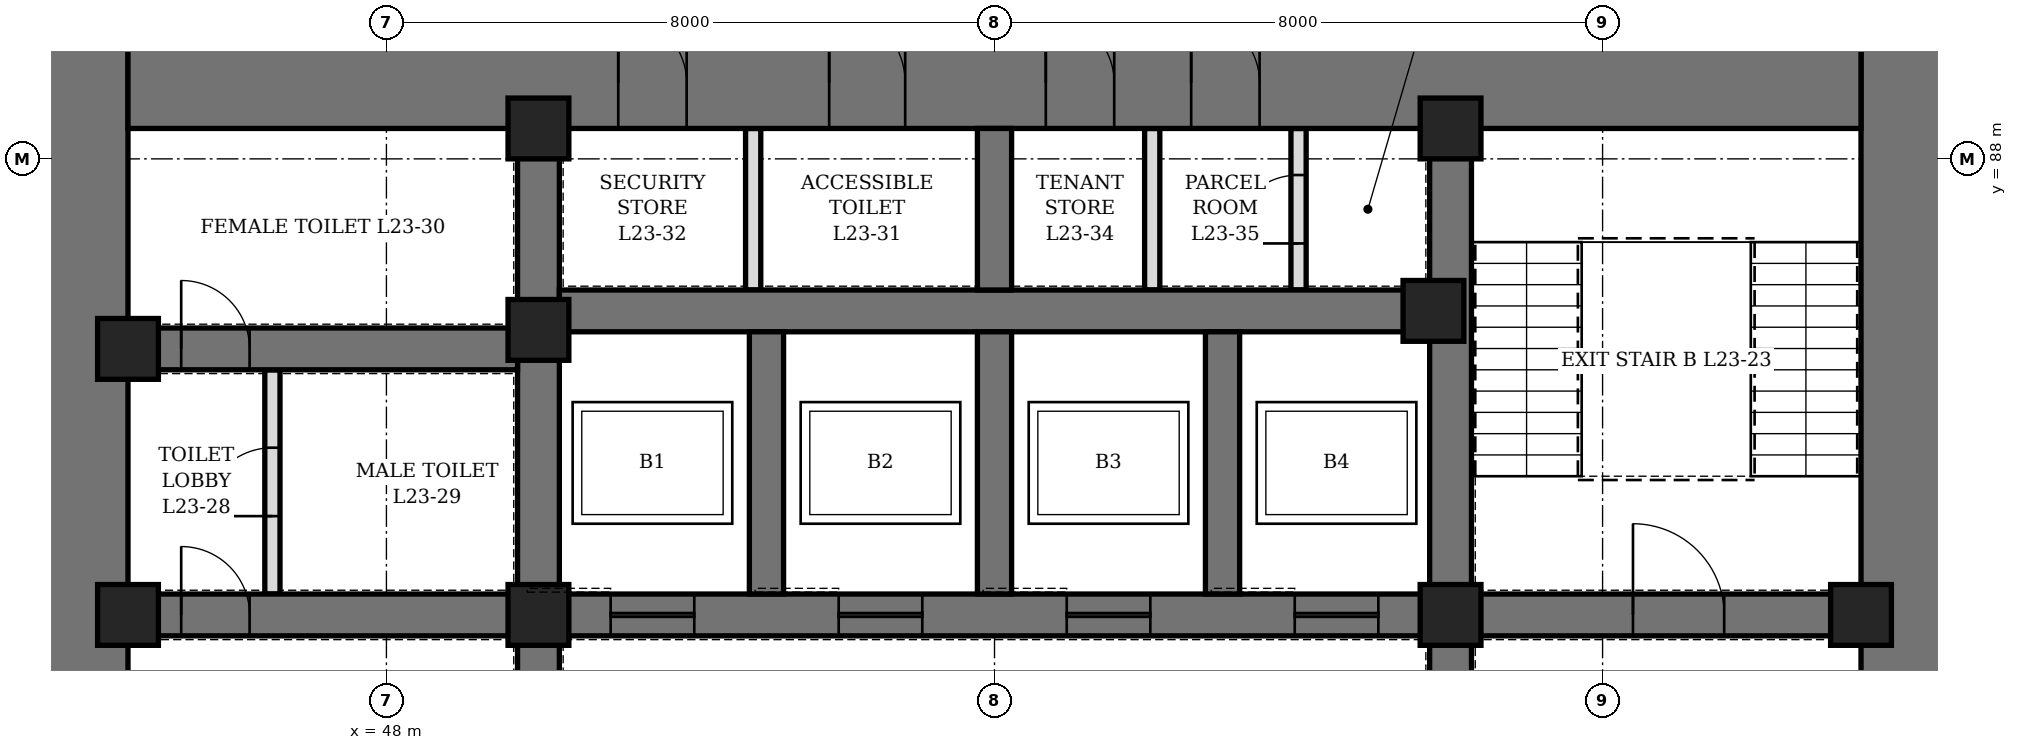
"""IFC4 building model, lengths in metres.
Left out: names, types, materials, properties, quantities, classifications, styles, units other than length and angle.
Written with IfcOpenShell. Run it as: python <this file> out.ifc"""

import sys

from ifc_helpers import new_model, si_unit, direction, frame, frame_2d, origin, origin_2d, place, context, subcontext, project, spatial, rectangle, hollow_rectangle, extrude, element, fill, save


model = new_model("IFC4")
c1 = context("Model", 3, precision=1e-05, world=origin(), true_north=direction((0.0, 1.0)))
c2 = subcontext(c1, "Body", "Model", "MODEL_VIEW")
j1 = project(units=[si_unit("LENGTHUNIT", "METRE"), si_unit("PLANEANGLEUNIT", "RADIAN")], contexts=[c1])
p1 = place(None, origin())
s1 = spatial("IfcSite", under=j1, at=p1, CompositionType="ELEMENT")
p2 = place(p1, origin())
s2 = spatial("IfcBuilding", under=s1, at=p2, CompositionType="ELEMENT")
p3 = place(p2, frame((0.0, 0.0, 108.1)))
s3 = spatial("IfcBuildingStorey", under=s2, at=p3, CompositionType="ELEMENT", Elevation=108.1)
p4 = place(p3, frame((44.0, 70.4, 0.0), z_axis=(0.0, 0.0, 1.0), x_axis=(0.0, 1.0, 0.0)))
e1 = element("IfcWall", 1, at=p4, inside=s3, PredefinedType="SHEAR", context=c2, shape_type="SweptSolid", body=[
    extrude(rectangle(XDim=19.2, YDim=1.2, at=frame_2d((9.6, 0.0))), origin(), (0.0, 0.0, 1.0), 4.2),
])
p5 = place(p4, frame((8.6, 0.0, 0.0)))
e2 = element("IfcOpeningElement", 2, at=p5, cuts=e1, PredefinedType="OPENING", context=c2, shape_type="SweptSolid", body=[
    extrude(rectangle(XDim=2.0, YDim=2.4, at=frame_2d((1.0, 1.2))), frame((0.0, 0.61, 0.0), z_axis=(0.0, -1.0, 0.0), x_axis=(1.0, 0.0, 0.0)), (0.0, 0.0, 1.0), 1.22),
])
p6 = place(p3, frame((68.0, 70.4, 0.0), z_axis=(0.0, 0.0, 1.0), x_axis=(0.0, 1.0, 0.0)))
e3 = element("IfcWall", 3, at=p6, inside=s3, PredefinedType="SHEAR", context=c2, shape_type="SweptSolid", body=[
    extrude(rectangle(XDim=19.2, YDim=1.2, at=frame_2d((9.6, 0.0))), origin(), (0.0, 0.0, 1.0), 4.2),
])
p7 = place(p6, frame((8.6, 0.0, 0.0)))
e4 = element("IfcOpeningElement", 4, at=p7, cuts=e3, PredefinedType="OPENING", context=c2, shape_type="SweptSolid", body=[
    extrude(rectangle(XDim=2.0, YDim=2.4, at=frame_2d((1.0, 1.2))), frame((0.0, 0.61, 0.0), z_axis=(0.0, -1.0, 0.0), x_axis=(1.0, 0.0, 0.0)), (0.0, 0.0, 1.0), 1.22),
])
p8 = place(p3, frame((44.6, 89.0, 0.0), z_axis=(0.0, 0.0, 1.0), x_axis=(1.0, 0.0, 0.0)))
e5 = element("IfcWall", 5, at=p8, inside=s3, PredefinedType="SHEAR", context=c2, shape_type="SweptSolid", body=[
    extrude(rectangle(XDim=22.8, YDim=1.2, at=frame_2d((11.4, 0.0))), origin(), (0.0, 0.0, 1.0), 4.2),
])
p9 = place(p8, frame((9.225, 0.0, 0.0)))
e6 = element("IfcOpeningElement", 6, at=p9, cuts=e5, PredefinedType="OPENING", context=c2, shape_type="SweptSolid", body=[
    extrude(rectangle(XDim=1.0, YDim=2.1, at=frame_2d((0.5, 1.05))), frame((0.0, 0.61, 0.0), z_axis=(0.0, -1.0, 0.0), x_axis=(1.0, 0.0, 0.0)), (0.0, 0.0, 1.0), 1.22),
])
p10 = place(p8, frame((6.45, 0.0, 0.0)))
e7 = element("IfcOpeningElement", 7, at=p10, cuts=e5, PredefinedType="OPENING", context=c2, shape_type="SweptSolid", body=[
    extrude(rectangle(XDim=0.9, YDim=2.1, at=frame_2d((0.45, 1.05))), frame((0.0, 0.61, 0.0), z_axis=(0.0, -1.0, 0.0), x_axis=(1.0, 0.0, 0.0)), (0.0, 0.0, 1.0), 1.22),
])
p11 = place(p8, frame((12.075, 0.0, 0.0)))
e8 = element("IfcOpeningElement", 8, at=p11, cuts=e5, PredefinedType="OPENING", context=c2, shape_type="SweptSolid", body=[
    extrude(rectangle(XDim=0.9, YDim=2.1, at=frame_2d((0.45, 1.05))), frame((0.0, 0.61, 0.0), z_axis=(0.0, -1.0, 0.0), x_axis=(1.0, 0.0, 0.0)), (0.0, 0.0, 1.0), 1.22),
])
p12 = place(p8, frame((13.988, 0.0, 0.0)))
e9 = element("IfcOpeningElement", 9, at=p12, cuts=e5, PredefinedType="OPENING", context=c2, shape_type="SweptSolid", body=[
    extrude(rectangle(XDim=0.9, YDim=2.1, at=frame_2d((0.45, 1.05))), frame((0.0, 0.61, 0.0), z_axis=(0.0, -1.0, 0.0), x_axis=(1.0, 0.0, 0.0)), (0.0, 0.0, 1.0), 1.22),
])
p13 = place(p3, frame((50.0, 71.6, 0.0), z_axis=(0.0, 0.0, 1.0), x_axis=(0.0, 1.0, 0.0)))
e10 = element("IfcWall", 10, at=p13, inside=s3, PredefinedType="SHEAR", context=c2, shape_type="SweptSolid", body=[
    extrude(rectangle(XDim=16.8, YDim=0.55, at=frame_2d((8.4, 0.0))), origin(), (0.0, 0.0, 1.0), 4.2),
])
p14 = place(p13, frame((7.5, 0.0, 0.0)))
e11 = element("IfcOpeningElement", 11, at=p14, cuts=e10, PredefinedType="OPENING", context=c2, shape_type="SweptSolid", body=[
    extrude(rectangle(XDim=1.8, YDim=2.4, at=frame_2d((0.9, 1.2))), frame((0.0, 0.285, 0.0), z_axis=(0.0, -1.0, 0.0), x_axis=(1.0, 0.0, 0.0)), (0.0, 0.0, 1.0), 0.57),
])
p15 = place(p3, frame((62.0, 71.6, 0.0), z_axis=(0.0, 0.0, 1.0), x_axis=(0.0, 1.0, 0.0)))
e12 = element("IfcWall", 12, at=p15, inside=s3, PredefinedType="SHEAR", context=c2, shape_type="SweptSolid", body=[
    extrude(rectangle(XDim=16.8, YDim=0.55, at=frame_2d((8.4, 0.0))), origin(), (0.0, 0.0, 1.0), 4.2),
])
p16 = place(p15, frame((7.5, 0.0, 0.0)))
e13 = element("IfcOpeningElement", 13, at=p16, cuts=e12, PredefinedType="OPENING", context=c2, shape_type="SweptSolid", body=[
    extrude(rectangle(XDim=1.8, YDim=2.4, at=frame_2d((0.9, 1.2))), frame((0.0, 0.285, 0.0), z_axis=(0.0, -1.0, 0.0), x_axis=(1.0, 0.0, 0.0)), (0.0, 0.0, 1.0), 0.57),
])
p17 = place(p3, frame((44.6, 82.0, 0.0), z_axis=(0.0, 0.0, 1.0), x_axis=(1.0, 0.0, 0.0)))
e14 = element("IfcWall", 14, at=p17, inside=s3, PredefinedType="SHEAR", context=c2, shape_type="SweptSolid", body=[
    extrude(rectangle(XDim=5.125, YDim=0.55, at=frame_2d((2.562, 0.0))), origin(), (0.0, 0.0, 1.0), 4.2),
])
p18 = place(p17, frame((0.7, 0.0, 0.0)))
e15 = element("IfcOpeningElement", 15, at=p18, cuts=e14, PredefinedType="OPENING", context=c2, shape_type="SweptSolid", body=[
    extrude(rectangle(XDim=0.9, YDim=2.1, at=frame_2d((0.45, 1.05))), frame((0.0, 0.285, 0.0), z_axis=(0.0, -1.0, 0.0), x_axis=(1.0, 0.0, 0.0)), (0.0, 0.0, 1.0), 0.57),
])
p19 = place(p3, frame((44.6, 85.5, 0.0), z_axis=(0.0, 0.0, 1.0), x_axis=(1.0, 0.0, 0.0)))
e16 = element("IfcWall", 16, at=p19, inside=s3, PredefinedType="SHEAR", context=c2, shape_type="SweptSolid", body=[
    extrude(rectangle(XDim=5.125, YDim=0.55, at=frame_2d((2.562, 0.0))), origin(), (0.0, 0.0, 1.0), 4.2),
])
p20 = place(p19, frame((0.7, 0.0, 0.0)))
e17 = element("IfcOpeningElement", 17, at=p20, cuts=e16, PredefinedType="OPENING", context=c2, shape_type="SweptSolid", body=[
    extrude(rectangle(XDim=0.9, YDim=2.1, at=frame_2d((0.45, 1.05))), frame((0.0, 0.285, 0.0), z_axis=(0.0, -1.0, 0.0), x_axis=(1.0, 0.0, 0.0)), (0.0, 0.0, 1.0), 0.57),
])
p21 = place(p3, frame((62.275, 82.0, 0.0), z_axis=(0.0, 0.0, 1.0), x_axis=(1.0, 0.0, 0.0)))
e18 = element("IfcWall", 18, at=p21, inside=s3, PredefinedType="SHEAR", context=c2, shape_type="SweptSolid", body=[
    extrude(rectangle(XDim=5.125, YDim=0.55, at=frame_2d((2.562, 0.0))), origin(), (0.0, 0.0, 1.0), 4.2),
])
p22 = place(p21, frame((2.125, 0.0, 0.0)))
e19 = element("IfcOpeningElement", 19, at=p22, cuts=e18, PredefinedType="OPENING", context=c2, shape_type="SweptSolid", body=[
    extrude(rectangle(XDim=1.2, YDim=2.1, at=frame_2d((0.6, 1.05))), frame((0.0, 0.285, 0.0), z_axis=(0.0, -1.0, 0.0), x_axis=(1.0, 0.0, 0.0)), (0.0, 0.0, 1.0), 0.57),
])
p23 = place(p3, frame((50.275, 82.0, 0.0), z_axis=(0.0, 0.0, 1.0), x_axis=(1.0, 0.0, 0.0)))
e20 = element("IfcWall", 20, at=p23, inside=s3, PredefinedType="SHEAR", context=c2, shape_type="SweptSolid", body=[
    extrude(rectangle(XDim=11.45, YDim=0.55, at=frame_2d((5.725, 0.0))), origin(), (0.0, 0.0, 1.0), 4.2),
])
p24 = place(p23, frame((0.675, 0.0, 0.0)))
e21 = element("IfcOpeningElement", 21, at=p24, cuts=e20, PredefinedType="OPENING", context=c2, shape_type="SweptSolid", body=[
    extrude(rectangle(XDim=1.1, YDim=2.2, at=frame_2d((0.55, 1.1))), frame((0.0, 0.285, 0.0), z_axis=(0.0, -1.0, 0.0), x_axis=(1.0, 0.0, 0.0)), (0.0, 0.0, 1.0), 0.57),
])
p25 = place(p23, frame((3.675, 0.0, 0.0)))
e22 = element("IfcOpeningElement", 22, at=p25, cuts=e20, PredefinedType="OPENING", context=c2, shape_type="SweptSolid", body=[
    extrude(rectangle(XDim=1.1, YDim=2.2, at=frame_2d((0.55, 1.1))), frame((0.0, 0.285, 0.0), z_axis=(0.0, -1.0, 0.0), x_axis=(1.0, 0.0, 0.0)), (0.0, 0.0, 1.0), 0.57),
])
p26 = place(p23, frame((6.675, 0.0, 0.0)))
e23 = element("IfcOpeningElement", 23, at=p26, cuts=e20, PredefinedType="OPENING", context=c2, shape_type="SweptSolid", body=[
    extrude(rectangle(XDim=1.1, YDim=2.2, at=frame_2d((0.55, 1.1))), frame((0.0, 0.285, 0.0), z_axis=(0.0, -1.0, 0.0), x_axis=(1.0, 0.0, 0.0)), (0.0, 0.0, 1.0), 0.57),
])
p27 = place(p23, frame((9.675, 0.0, 0.0)))
e24 = element("IfcOpeningElement", 24, at=p27, cuts=e20, PredefinedType="OPENING", context=c2, shape_type="SweptSolid", body=[
    extrude(rectangle(XDim=1.1, YDim=2.2, at=frame_2d((0.55, 1.1))), frame((0.0, 0.285, 0.0), z_axis=(0.0, -1.0, 0.0), x_axis=(1.0, 0.0, 0.0)), (0.0, 0.0, 1.0), 0.57),
])
p28 = place(p3, frame((50.275, 86.0, 0.0), z_axis=(0.0, 0.0, 1.0), x_axis=(1.0, 0.0, 0.0)))
e25 = element("IfcWall", 25, at=p28, inside=s3, PredefinedType="SHEAR", context=c2, shape_type="SweptSolid", body=[
    extrude(rectangle(XDim=11.45, YDim=0.55, at=frame_2d((5.725, 0.0))), origin(), (0.0, 0.0, 1.0), 4.2),
])
for number, where, z_axis, x_axis in (
    (26, (53.0, 82.275, 0.0), (0.0, 0.0, 1.0), (0.0, 1.0, 0.0)),
    (27, (56.0, 82.275, 0.0), (0.0, 0.0, 1.0), (0.0, 1.0, 0.0)),
    (28, (59.0, 82.275, 0.0), (0.0, 0.0, 1.0), (0.0, 1.0, 0.0)),
):
    element("IfcWall", number, at=place(p3, frame(where, z_axis=z_axis, x_axis=x_axis)), inside=s3, PredefinedType="SHEAR", context=c2, shape_type="SweptSolid", body=[
        extrude(rectangle(XDim=3.45, YDim=0.45, at=frame_2d((1.725, 0.0))), origin(), (0.0, 0.0, 1.0), 4.2),
    ])
p29 = place(p3, frame((56.0, 86.275, 0.0), z_axis=(0.0, 0.0, 1.0), x_axis=(0.0, 1.0, 0.0)))
e29 = element("IfcWall", 29, at=p29, inside=s3, PredefinedType="SHEAR", context=c2, shape_type="SweptSolid", body=[
    extrude(rectangle(XDim=2.125, YDim=0.45, at=frame_2d((1.062, 0.0))), origin(), (0.0, 0.0, 1.0), 4.2),
])
for number, where, z_axis, x_axis in (
    (30, (44.6, 82.0, 0.0), (0.0, 0.0, 1.0), (1.0, 0.0, 0.0)),
    (31, (44.6, 85.5, 0.0), (0.0, 0.0, 1.0), (1.0, 0.0, 0.0)),
    (32, (50.0, 82.0, 0.0), (0.0, 0.0, 1.0), (1.0, 0.0, 0.0)),
    (33, (50.0, 85.75, 0.0), (0.0, 0.0, 1.0), (1.0, 0.0, 0.0)),
    (34, (50.0, 88.4, 0.0), (0.0, 0.0, 1.0), (1.0, 0.0, 0.0)),
    (35, (61.775, 86.0, 0.0), (0.0, 0.0, 1.0), (1.0, 0.0, 0.0)),
    (36, (62.0, 82.0, 0.0), (0.0, 0.0, 1.0), (1.0, 0.0, 0.0)),
    (37, (62.0, 88.4, 0.0), (0.0, 0.0, 1.0), (1.0, 0.0, 0.0)),
    (38, (67.4, 82.0, 0.0), (0.0, 0.0, 1.0), (1.0, 0.0, 0.0)),
):
    element("IfcColumn", number, at=place(p3, frame(where, z_axis=z_axis, x_axis=x_axis)), inside=s3, PredefinedType="COLUMN", context=c2, shape_type="SweptSolid", body=[
        extrude(hollow_rectangle(XDim=0.8, YDim=0.8, WallThickness=0.1, at=origin_2d()), origin(), (0.0, 0.0, 1.0), 4.2),
    ])
p30 = place(p3, frame((46.5, 82.275, 0.0), z_axis=(0.0, 0.0, 1.0), x_axis=(0.0, 1.0, 0.0)))
e39 = element("IfcWall", 39, at=p30, inside=s3, PredefinedType="PARTITIONING", context=c2, shape_type="SweptSolid", body=[
    extrude(rectangle(XDim=2.95, YDim=0.2, at=frame_2d((1.475, 0.0))), origin(), (0.0, 0.0, 1.0), 4.04),
])
p31 = place(p30, frame((1.025, 0.0, 0.0)))
e40 = element("IfcOpeningElement", 40, at=p31, cuts=e39, PredefinedType="OPENING", context=c2, shape_type="SweptSolid", body=[
    extrude(rectangle(XDim=0.9, YDim=2.1, at=frame_2d((0.45, 1.05))), frame((0.0, 0.11, 0.0), z_axis=(0.0, -1.0, 0.0), x_axis=(1.0, 0.0, 0.0)), (0.0, 0.0, 1.0), 0.22),
])
p32 = place(p3, frame((52.825, 86.275, 0.0), z_axis=(0.0, 0.0, 1.0), x_axis=(0.0, 1.0, 0.0)))
e41 = element("IfcWall", 41, at=p32, inside=s3, PredefinedType="PARTITIONING", context=c2, shape_type="SweptSolid", body=[
    extrude(rectangle(XDim=2.125, YDim=0.2, at=frame_2d((1.062, 0.0))), origin(), (0.0, 0.0, 1.0), 4.04),
])
p33 = place(p3, frame((60.0, 86.275, 0.0), z_axis=(0.0, 0.0, 1.0), x_axis=(0.0, 1.0, 0.0)))
e42 = element("IfcWall", 42, at=p33, inside=s3, PredefinedType="PARTITIONING", context=c2, shape_type="SweptSolid", body=[
    extrude(rectangle(XDim=2.125, YDim=0.2, at=frame_2d((1.062, 0.0))), origin(), (0.0, 0.0, 1.0), 4.04),
])
p34 = place(p33, frame((0.613, 0.0, 0.0)))
e43 = element("IfcOpeningElement", 43, at=p34, cuts=e42, PredefinedType="OPENING", context=c2, shape_type="SweptSolid", body=[
    extrude(rectangle(XDim=0.9, YDim=2.1, at=frame_2d((0.45, 1.05))), frame((0.0, 0.11, 0.0), z_axis=(0.0, -1.0, 0.0), x_axis=(1.0, 0.0, 0.0)), (0.0, 0.0, 1.0), 0.22),
])
p35 = place(p3, frame((58.075, 86.275, 0.0), z_axis=(0.0, 0.0, 1.0), x_axis=(0.0, 1.0, 0.0)))
e44 = element("IfcWall", 44, at=p35, inside=s3, PredefinedType="PARTITIONING", context=c2, shape_type="SweptSolid", body=[
    extrude(rectangle(XDim=2.125, YDim=0.2, at=frame_2d((1.062, 0.0))), origin(), (0.0, 0.0, 1.0), 4.04),
])
p36 = place(p18, origin())
e45 = element("IfcDoor", 45, at=p36, inside=s3, OperationType="SINGLE_SWING_LEFT", PredefinedType="DOOR", context=c2, shape_type="SweptSolid", body=[
    extrude(rectangle(XDim=0.9, YDim=2.1, at=frame_2d((0.45, 1.05))), frame((0.0, 0.275, 0.0), z_axis=(0.0, -1.0, 0.0), x_axis=(1.0, 0.0, 0.0)), (0.0, 0.0, 1.0), 0.55),
])
fill(e15, e45)
p37 = place(p31, origin())
e46 = element("IfcDoor", 46, at=p37, inside=s3, OperationType="SINGLE_SWING_RIGHT", PredefinedType="DOOR", context=c2, shape_type="SweptSolid", body=[
    extrude(rectangle(XDim=0.9, YDim=2.1, at=frame_2d((0.45, 1.05))), frame((0.0, 0.1, 0.0), z_axis=(0.0, -1.0, 0.0), x_axis=(1.0, 0.0, 0.0)), (0.0, 0.0, 1.0), 0.199),
])
fill(e40, e46)
p38 = place(p20, origin())
e47 = element("IfcDoor", 47, at=p38, inside=s3, OperationType="SINGLE_SWING_RIGHT", PredefinedType="DOOR", context=c2, shape_type="SweptSolid", body=[
    extrude(rectangle(XDim=0.9, YDim=2.1, at=frame_2d((0.45, 1.05))), frame((0.0, 0.275, 0.0), z_axis=(0.0, -1.0, 0.0), x_axis=(1.0, 0.0, 0.0)), (0.0, 0.0, 1.0), 0.55),
])
fill(e17, e47)
p39 = place(p9, origin())
e48 = element("IfcDoor", 48, at=p39, inside=s3, OperationType="SINGLE_SWING_LEFT", PredefinedType="DOOR", context=c2, shape_type="SweptSolid", body=[
    extrude(rectangle(XDim=1.0, YDim=2.1, at=frame_2d((0.5, 1.05))), frame((0.0, 0.35, 0.0), z_axis=(0.0, -1.0, 0.0), x_axis=(1.0, 0.0, 0.0)), (0.0, 0.0, 1.0), 0.7),
])
fill(e6, e48)
p40 = place(p10, origin())
e49 = element("IfcDoor", 49, at=p40, inside=s3, OperationType="SINGLE_SWING_LEFT", PredefinedType="DOOR", context=c2, shape_type="SweptSolid", body=[
    extrude(rectangle(XDim=0.9, YDim=2.1, at=frame_2d((0.45, 1.05))), frame((0.0, 0.35, 0.0), z_axis=(0.0, -1.0, 0.0), x_axis=(1.0, 0.0, 0.0)), (0.0, 0.0, 1.0), 0.7),
])
fill(e7, e49)
p41 = place(p11, origin())
e50 = element("IfcDoor", 50, at=p41, inside=s3, OperationType="SINGLE_SWING_LEFT", PredefinedType="DOOR", context=c2, shape_type="SweptSolid", body=[
    extrude(rectangle(XDim=0.9, YDim=2.1, at=frame_2d((0.45, 1.05))), frame((0.0, 0.35, 0.0), z_axis=(0.0, -1.0, 0.0), x_axis=(1.0, 0.0, 0.0)), (0.0, 0.0, 1.0), 0.7),
])
fill(e8, e50)
p42 = place(p12, origin())
e51 = element("IfcDoor", 51, at=p42, inside=s3, OperationType="SINGLE_SWING_LEFT", PredefinedType="DOOR", context=c2, shape_type="SweptSolid", body=[
    extrude(rectangle(XDim=0.9, YDim=2.1, at=frame_2d((0.45, 1.05))), frame((0.0, 0.35, 0.0), z_axis=(0.0, -1.0, 0.0), x_axis=(1.0, 0.0, 0.0)), (0.0, 0.0, 1.0), 0.7),
])
fill(e9, e51)
p43 = place(p34, origin())
e52 = element("IfcDoor", 52, at=p43, inside=s3, OperationType="SINGLE_SWING_LEFT", PredefinedType="DOOR", context=c2, shape_type="SweptSolid", body=[
    extrude(rectangle(XDim=0.9, YDim=2.1, at=frame_2d((0.45, 1.05))), frame((0.0, 0.1, 0.0), z_axis=(0.0, -1.0, 0.0), x_axis=(1.0, 0.0, 0.0)), (0.0, 0.0, 1.0), 0.199),
])
fill(e43, e52)
p44 = place(p22, origin())
e53 = element("IfcDoor", 53, at=p44, inside=s3, OperationType="SINGLE_SWING_LEFT", PredefinedType="DOOR", context=c2, shape_type="SweptSolid", body=[
    extrude(rectangle(XDim=1.2, YDim=2.1, at=frame_2d((0.6, 1.05))), frame((0.0, 0.275, 0.0), z_axis=(0.0, -1.0, 0.0), x_axis=(1.0, 0.0, 0.0)), (0.0, 0.0, 1.0), 0.55),
])
fill(e19, e53)
p45 = place(p24, origin())
e54 = element("IfcDoor", 54, at=p45, inside=s3, OperationType="SLIDING_TO_LEFT", PredefinedType="DOOR", context=c2, shape_type="SweptSolid", body=[
    extrude(rectangle(XDim=1.1, YDim=2.2, at=frame_2d((0.55, 1.1))), frame((0.0, 0.275, 0.0), z_axis=(0.0, -1.0, 0.0), x_axis=(1.0, 0.0, 0.0)), (0.0, 0.0, 1.0), 0.55),
])
fill(e21, e54)
p46 = place(p25, origin())
e55 = element("IfcDoor", 55, at=p46, inside=s3, OperationType="SLIDING_TO_LEFT", PredefinedType="DOOR", context=c2, shape_type="SweptSolid", body=[
    extrude(rectangle(XDim=1.1, YDim=2.2, at=frame_2d((0.55, 1.1))), frame((0.0, 0.275, 0.0), z_axis=(0.0, -1.0, 0.0), x_axis=(1.0, 0.0, 0.0)), (0.0, 0.0, 1.0), 0.55),
])
fill(e22, e55)
p47 = place(p26, origin())
e56 = element("IfcDoor", 56, at=p47, inside=s3, OperationType="SLIDING_TO_LEFT", PredefinedType="DOOR", context=c2, shape_type="SweptSolid", body=[
    extrude(rectangle(XDim=1.1, YDim=2.2, at=frame_2d((0.55, 1.1))), frame((0.0, 0.275, 0.0), z_axis=(0.0, -1.0, 0.0), x_axis=(1.0, 0.0, 0.0)), (0.0, 0.0, 1.0), 0.55),
])
fill(e23, e56)
p48 = place(p27, origin())
e57 = element("IfcDoor", 57, at=p48, inside=s3, OperationType="SLIDING_TO_LEFT", PredefinedType="DOOR", context=c2, shape_type="SweptSolid", body=[
    extrude(rectangle(XDim=1.1, YDim=2.2, at=frame_2d((0.55, 1.1))), frame((0.0, 0.275, 0.0), z_axis=(0.0, -1.0, 0.0), x_axis=(1.0, 0.0, 0.0)), (0.0, 0.0, 1.0), 0.55),
])
fill(e24, e57)
save(model, sys.argv[1])
